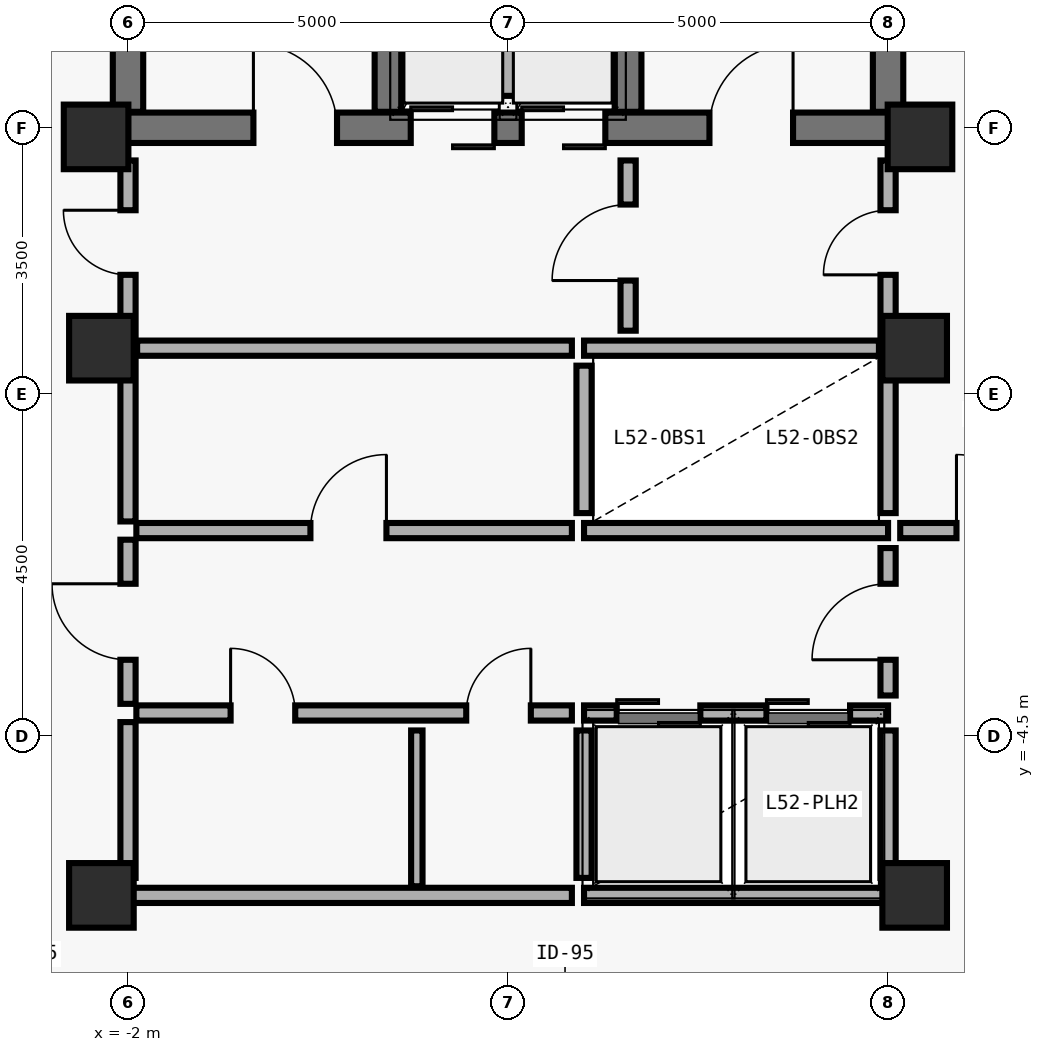
"""IFC4 building model, lengths in metres.
Left out: names, types, materials, properties, quantities, classifications, styles, units other than length and angle.
Written with IfcOpenShell. Run it as: python <this file> out.ifc"""

import sys

from ifc_helpers import new_model, si_unit, direction, frame, frame_2d, origin, origin_2d, place, context, subcontext, project, spatial, rectangle, extrude, element, fill, save


model = new_model("IFC4")
c1 = context("Model", 3, precision=1e-05, world=origin(), true_north=direction((0.0, 1.0)))
c2 = subcontext(c1, "Body", "Model", "MODEL_VIEW")
j1 = project(units=[si_unit("LENGTHUNIT", "METRE"), si_unit("PLANEANGLEUNIT", "RADIAN")], contexts=[c1])
p1 = place(None, origin())
s1 = spatial("IfcSite", under=j1, at=p1, CompositionType="ELEMENT")
p2 = place(p1, origin())
s2 = spatial("IfcBuilding", under=s1, at=p2, CompositionType="ELEMENT")
p3 = place(p2, frame((0.0, 0.0, 207.6)))
s3 = spatial("IfcBuildingStorey", under=s2, at=p3, CompositionType="ELEMENT", Elevation=207.6)
p4 = place(p3, frame((-2.0, 3.5, 0.0), z_axis=(0.0, 0.0, 1.0), x_axis=(1.0, 0.0, 0.0)))
e1 = element("IfcWall", 1, at=p4, inside=s3, PredefinedType="SHEAR", context=c2, shape_type="SweptSolid", body=[
    extrude(rectangle(XDim=10.0, YDim=0.4, at=frame_2d((5.0, 0.0))), origin(), (0.0, 0.0, 1.0), 3.592),
])
p5 = place(p4, frame((1.65, 0.0, 0.0)))
e2 = element("IfcOpeningElement", 2, at=p5, cuts=e1, PredefinedType="OPENING", context=c2, shape_type="SweptSolid", body=[
    extrude(rectangle(XDim=1.1, YDim=2.15, at=frame_2d((0.55, 1.075))), frame((0.0, 0.21, 0.0), z_axis=(0.0, -1.0, 0.0), x_axis=(1.0, 0.0, 0.0)), (0.0, 0.0, 1.0), 0.42),
])
p6 = place(p4, frame((7.65, 0.0, 0.0)))
e3 = element("IfcOpeningElement", 3, at=p6, cuts=e1, PredefinedType="OPENING", context=c2, shape_type="SweptSolid", body=[
    extrude(rectangle(XDim=1.1, YDim=2.15, at=frame_2d((0.55, 1.075))), frame((0.0, 0.21, 0.0), z_axis=(0.0, -1.0, 0.0), x_axis=(1.0, 0.0, 0.0)), (0.0, 0.0, 1.0), 0.42),
])
p7 = place(p4, frame((3.72, 0.0, 0.0)))
e4 = element("IfcOpeningElement", 4, at=p7, cuts=e1, PredefinedType="OPENING", context=c2, shape_type="SweptSolid", body=[
    extrude(rectangle(XDim=1.1, YDim=2.2, at=frame_2d((0.55, 1.1))), frame((0.0, 0.21, 0.0), z_axis=(0.0, -1.0, 0.0), x_axis=(1.0, 0.0, 0.0)), (0.0, 0.0, 1.0), 0.42),
])
p8 = place(p4, frame((5.18, 0.0, 0.0)))
e5 = element("IfcOpeningElement", 5, at=p8, cuts=e1, PredefinedType="OPENING", context=c2, shape_type="SweptSolid", body=[
    extrude(rectangle(XDim=1.1, YDim=2.2, at=frame_2d((0.55, 1.1))), frame((0.0, 0.21, 0.0), z_axis=(0.0, -1.0, 0.0), x_axis=(1.0, 0.0, 0.0)), (0.0, 0.0, 1.0), 0.42),
])
for number, where, z_axis, x_axis in (
    (6, (-2.0, 3.71, 0.0), (0.0, 0.0, 1.0), (0.0, 1.0, 0.0)),
    (7, (8.0, 3.71, 0.0), (0.0, 0.0, 1.0), (0.0, 1.0, 0.0)),
):
    element("IfcWall", number, at=place(p3, frame(where, z_axis=z_axis, x_axis=x_axis)), inside=s3, PredefinedType="SHEAR", context=c2, shape_type="SweptSolid", body=[
        extrude(rectangle(XDim=8.58, YDim=0.4, at=frame_2d((4.29, 0.0))), origin(), (0.0, 0.0, 1.0), 3.592),
    ])
for number, where, z_axis, x_axis in (
    (8, (1.42, 3.71, 0.0), (0.0, 0.0, 1.0), (0.0, 1.0, 0.0)),
    (9, (4.58, 3.71, 0.0), (0.0, 0.0, 1.0), (0.0, 1.0, 0.0)),
):
    element("IfcWall", number, at=place(p3, frame(where, z_axis=z_axis, x_axis=x_axis)), inside=s3, PredefinedType="SHEAR", context=c2, shape_type="SweptSolid", body=[
        extrude(rectangle(XDim=8.58, YDim=0.35, at=frame_2d((4.29, 0.0))), origin(), (0.0, 0.0, 1.0), 3.592),
    ])
for number, where, z_axis, x_axis in (
    (10, (-2.42, 3.38, 0.0), (0.0, 0.0, 1.0), (1.0, 0.0, 0.0)),
    (11, (8.42, 3.38, 0.0), (0.0, 0.0, 1.0), (1.0, 0.0, 0.0)),
    (12, (-2.35, 0.6, 0.0), (0.0, 0.0, 1.0), (1.0, 0.0, 0.0)),
    (13, (8.35, 0.6, 0.0), (0.0, 0.0, 1.0), (1.0, 0.0, 0.0)),
    (14, (-2.35, -6.6, 0.0), (0.0, 0.0, 1.0), (1.0, 0.0, 0.0)),
    (15, (8.35, -6.6, 0.0), (0.0, 0.0, 1.0), (1.0, 0.0, 0.0)),
):
    element("IfcColumn", number, at=place(p3, frame(where, z_axis=z_axis, x_axis=x_axis)), inside=s3, PredefinedType="COLUMN", context=c2, shape_type="SweptSolid", body=[
        extrude(rectangle(XDim=0.85, YDim=0.85, at=origin_2d()), origin(), (0.0, 0.0, 1.0), 3.575),
    ])
p9 = place(p3, frame((3.0, 3.92, 0.0), z_axis=(0.0, 0.0, 1.0), x_axis=(0.0, 1.0, 0.0)))
e16 = element("IfcWall", 16, at=p9, inside=s3, PredefinedType="SOLIDWALL", context=c2, shape_type="SweptSolid", body=[
    extrude(rectangle(XDim=2.03, YDim=0.2, at=frame_2d((1.015, 0.0))), origin(), (0.0, 0.0, 1.0), 3.36),
])
p10 = place(p3, frame((4.0, 0.6, 0.0), z_axis=(0.0, 0.0, 1.0), x_axis=(1.0, 0.0, 0.0)))
e17 = element("IfcWall", 17, at=p10, inside=s3, PredefinedType="SOLIDWALL", context=c2, shape_type="SweptSolid", body=[
    extrude(rectangle(XDim=3.88, YDim=0.2, at=frame_2d((1.94, 0.0))), origin(), (0.0, 0.0, 1.0), 3.012),
])
p11 = place(p3, frame((4.0, -1.8, 0.0), z_axis=(0.0, 0.0, 1.0), x_axis=(1.0, 0.0, 0.0)))
e18 = element("IfcWall", 18, at=p11, inside=s3, PredefinedType="SOLIDWALL", context=c2, shape_type="SweptSolid", body=[
    extrude(rectangle(XDim=4.0, YDim=0.2, at=frame_2d((2.0, 0.0))), origin(), (0.0, 0.0, 1.0), 3.36),
])
p12 = place(p3, frame((4.0, -1.57, 0.0), z_axis=(0.0, 0.0, 1.0), x_axis=(0.0, 1.0, 0.0)))
e19 = element("IfcWall", 19, at=p12, inside=s3, PredefinedType="SOLIDWALL", context=c2, shape_type="SweptSolid", body=[
    extrude(rectangle(XDim=1.94, YDim=0.2, at=frame_2d((0.97, 0.0))), origin(), (0.0, 0.0, 1.0), 3.36),
])
p13 = place(p3, frame((8.0, -1.57, 0.0), z_axis=(0.0, 0.0, 1.0), x_axis=(0.0, 1.0, 0.0)))
e20 = element("IfcWall", 20, at=p13, inside=s3, PredefinedType="SOLIDWALL", context=c2, shape_type="SweptSolid", body=[
    extrude(rectangle(XDim=2.05, YDim=0.2, at=frame_2d((1.025, 0.0))), origin(), (0.0, 0.0, 1.0), 3.012),
])
p14 = place(p3, frame((4.0, -4.2, 0.0), z_axis=(0.0, 0.0, 1.0), x_axis=(1.0, 0.0, 0.0)))
e21 = element("IfcWall", 21, at=p14, inside=s3, PredefinedType="SOLIDWALL", context=c2, shape_type="SweptSolid", body=[
    extrude(rectangle(XDim=4.0, YDim=0.2, at=frame_2d((2.0, 0.0))), origin(), (0.0, 0.0, 1.0), 3.36),
])
p15 = place(p14, frame((0.43, 0.0, 0.0)))
e22 = element("IfcOpeningElement", 22, at=p15, cuts=e21, PredefinedType="OPENING", context=c2, shape_type="SweptSolid", body=[
    extrude(rectangle(XDim=1.1, YDim=2.2, at=frame_2d((0.55, 1.1))), frame((0.0, 0.11, 0.0), z_axis=(0.0, -1.0, 0.0), x_axis=(1.0, 0.0, 0.0)), (0.0, 0.0, 1.0), 0.22),
])
p16 = place(p14, frame((2.4, 0.0, 0.0)))
e23 = element("IfcOpeningElement", 23, at=p16, cuts=e21, PredefinedType="OPENING", context=c2, shape_type="SweptSolid", body=[
    extrude(rectangle(XDim=1.1, YDim=2.2, at=frame_2d((0.55, 1.1))), frame((0.0, 0.11, 0.0), z_axis=(0.0, -1.0, 0.0), x_axis=(1.0, 0.0, 0.0)), (0.0, 0.0, 1.0), 0.22),
])
p17 = place(p3, frame((4.0, -6.6, 0.0), z_axis=(0.0, 0.0, 1.0), x_axis=(1.0, 0.0, 0.0)))
e24 = element("IfcWall", 24, at=p17, inside=s3, PredefinedType="SOLIDWALL", context=c2, shape_type="SweptSolid", body=[
    extrude(rectangle(XDim=4.0, YDim=0.2, at=frame_2d((2.0, 0.0))), origin(), (0.0, 0.0, 1.0), 3.012),
])
p18 = place(p3, frame((4.0, -6.37, 0.0), z_axis=(0.0, 0.0, 1.0), x_axis=(0.0, 1.0, 0.0)))
e25 = element("IfcWall", 25, at=p18, inside=s3, PredefinedType="SOLIDWALL", context=c2, shape_type="SweptSolid", body=[
    extrude(rectangle(XDim=1.94, YDim=0.2, at=frame_2d((0.97, 0.0))), origin(), (0.0, 0.0, 1.0), 3.36),
])
p19 = place(p3, frame((8.0, -6.37, 0.0), z_axis=(0.0, 0.0, 1.0), x_axis=(0.0, 1.0, 0.0)))
e26 = element("IfcWall", 26, at=p19, inside=s3, PredefinedType="SOLIDWALL", context=c2, shape_type="SweptSolid", body=[
    extrude(rectangle(XDim=1.94, YDim=0.2, at=frame_2d((0.97, 0.0))), origin(), (0.0, 0.0, 1.0), 3.012),
])
p20 = place(p3, frame((4.58, 0.83, 0.0), z_axis=(0.0, 0.0, 1.0), x_axis=(0.0, 1.0, 0.0)))
e27 = element("IfcWall", 27, at=p20, inside=s3, PredefinedType="MOVABLE", context=c2, shape_type="SweptSolid", body=[
    extrude(rectangle(XDim=2.24, YDim=0.2, at=frame_2d((1.12, 0.0))), origin(), (0.0, 0.0, 1.0), 3.36),
])
p21 = place(p20, frame((0.66, 0.0, 0.0)))
e28 = element("IfcOpeningElement", 28, at=p21, cuts=e27, PredefinedType="OPENING", context=c2, shape_type="SweptSolid", body=[
    extrude(rectangle(XDim=1.0, YDim=2.1, at=frame_2d((0.5, 1.05))), frame((0.0, 0.11, 0.0), z_axis=(0.0, -1.0, 0.0), x_axis=(1.0, 0.0, 0.0)), (0.0, 0.0, 1.0), 0.22),
])
p22 = place(p3, frame((-2.0, 0.72, 0.0), z_axis=(0.0, 0.0, 1.0), x_axis=(0.0, 1.0, 0.0)))
e29 = element("IfcWall", 29, at=p22, inside=s3, PredefinedType="MOVABLE", context=c2, shape_type="SweptSolid", body=[
    extrude(rectangle(XDim=2.35, YDim=0.2, at=frame_2d((1.175, 0.0))), origin(), (0.0, 0.0, 1.0), 2.692),
])
p23 = place(p22, frame((0.845, 0.0, 0.0)))
e30 = element("IfcOpeningElement", 30, at=p23, cuts=e29, PredefinedType="OPENING", context=c2, shape_type="SweptSolid", body=[
    extrude(rectangle(XDim=0.85, YDim=2.1, at=frame_2d((0.425, 1.05))), frame((0.0, 0.11, 0.0), z_axis=(0.0, -1.0, 0.0), x_axis=(1.0, 0.0, 0.0)), (0.0, 0.0, 1.0), 0.22),
])
p24 = place(p3, frame((8.0, 0.72, 0.0), z_axis=(0.0, 0.0, 1.0), x_axis=(0.0, 1.0, 0.0)))
e31 = element("IfcWall", 31, at=p24, inside=s3, PredefinedType="MOVABLE", context=c2, shape_type="SweptSolid", body=[
    extrude(rectangle(XDim=2.35, YDim=0.2, at=frame_2d((1.175, 0.0))), origin(), (0.0, 0.0, 1.0), 2.692),
])
p25 = place(p24, frame((0.845, 0.0, 0.0)))
e32 = element("IfcOpeningElement", 32, at=p25, cuts=e31, PredefinedType="OPENING", context=c2, shape_type="SweptSolid", body=[
    extrude(rectangle(XDim=0.85, YDim=2.1, at=frame_2d((0.425, 1.05))), frame((0.0, 0.11, 0.0), z_axis=(0.0, -1.0, 0.0), x_axis=(1.0, 0.0, 0.0)), (0.0, 0.0, 1.0), 0.22),
])
p26 = place(p3, frame((-2.0, -4.08, 0.0), z_axis=(0.0, 0.0, 1.0), x_axis=(0.0, 1.0, 0.0)))
e33 = element("IfcWall", 33, at=p26, inside=s3, PredefinedType="MOVABLE", context=c2, shape_type="SweptSolid", body=[
    extrude(rectangle(XDim=2.16, YDim=0.2, at=frame_2d((1.08, 0.0))), origin(), (0.0, 0.0, 1.0), 3.012),
])
p27 = place(p26, frame((0.58, 0.0, 0.0)))
e34 = element("IfcOpeningElement", 34, at=p27, cuts=e33, PredefinedType="OPENING", context=c2, shape_type="SweptSolid", body=[
    extrude(rectangle(XDim=1.0, YDim=2.1, at=frame_2d((0.5, 1.05))), frame((0.0, 0.11, 0.0), z_axis=(0.0, -1.0, 0.0), x_axis=(1.0, 0.0, 0.0)), (0.0, 0.0, 1.0), 0.22),
])
p28 = place(p3, frame((8.0, -3.97, 0.0), z_axis=(0.0, 0.0, 1.0), x_axis=(0.0, 1.0, 0.0)))
e35 = element("IfcWall", 35, at=p28, inside=s3, PredefinedType="MOVABLE", context=c2, shape_type="SweptSolid", body=[
    extrude(rectangle(XDim=1.94, YDim=0.2, at=frame_2d((0.97, 0.0))), origin(), (0.0, 0.0, 1.0), 3.012),
])
p29 = place(p28, frame((0.47, 0.0, 0.0)))
e36 = element("IfcOpeningElement", 36, at=p29, cuts=e35, PredefinedType="OPENING", context=c2, shape_type="SweptSolid", body=[
    extrude(rectangle(XDim=1.0, YDim=2.1, at=frame_2d((0.5, 1.05))), frame((0.0, 0.11, 0.0), z_axis=(0.0, -1.0, 0.0), x_axis=(1.0, 0.0, 0.0)), (0.0, 0.0, 1.0), 0.22),
])
p30 = place(p3, frame((-1.89, -1.8, 0.0), z_axis=(0.0, 0.0, 1.0), x_axis=(1.0, 0.0, 0.0)))
e37 = element("IfcWall", 37, at=p30, inside=s3, PredefinedType="MOVABLE", context=c2, shape_type="SweptSolid", body=[
    extrude(rectangle(XDim=5.73, YDim=0.2, at=frame_2d((2.865, 0.0))), origin(), (0.0, 0.0, 1.0), 3.36),
])
p31 = place(p30, frame((2.29, 0.0, 0.0)))
e38 = element("IfcOpeningElement", 38, at=p31, cuts=e37, PredefinedType="OPENING", context=c2, shape_type="SweptSolid", body=[
    extrude(rectangle(XDim=1.0, YDim=2.1, at=frame_2d((0.5, 1.05))), frame((0.0, 0.11, 0.0), z_axis=(0.0, -1.0, 0.0), x_axis=(1.0, 0.0, 0.0)), (0.0, 0.0, 1.0), 0.22),
])
p32 = place(p3, frame((-1.89, -4.2, 0.0), z_axis=(0.0, 0.0, 1.0), x_axis=(1.0, 0.0, 0.0)))
e39 = element("IfcWall", 39, at=p32, inside=s3, PredefinedType="MOVABLE", context=c2, shape_type="SweptSolid", body=[
    extrude(rectangle(XDim=5.73, YDim=0.2, at=frame_2d((2.865, 0.0))), origin(), (0.0, 0.0, 1.0), 3.36),
])
p33 = place(p32, frame((1.24, 0.0, 0.0)))
e40 = element("IfcOpeningElement", 40, at=p33, cuts=e39, PredefinedType="OPENING", context=c2, shape_type="SweptSolid", body=[
    extrude(rectangle(XDim=0.85, YDim=2.1, at=frame_2d((0.425, 1.05))), frame((0.0, 0.11, 0.0), z_axis=(0.0, -1.0, 0.0), x_axis=(1.0, 0.0, 0.0)), (0.0, 0.0, 1.0), 0.22),
])
p34 = place(p32, frame((4.34, 0.0, 0.0)))
e41 = element("IfcOpeningElement", 41, at=p34, cuts=e39, PredefinedType="OPENING", context=c2, shape_type="SweptSolid", body=[
    extrude(rectangle(XDim=0.85, YDim=2.1, at=frame_2d((0.425, 1.05))), frame((0.0, 0.11, 0.0), z_axis=(0.0, -1.0, 0.0), x_axis=(1.0, 0.0, 0.0)), (0.0, 0.0, 1.0), 0.22),
])
p35 = place(p3, frame((8.16, -1.8, 0.0), z_axis=(0.0, 0.0, 1.0), x_axis=(1.0, 0.0, 0.0)))
e42 = element("IfcWall", 42, at=p35, inside=s3, PredefinedType="MOVABLE", context=c2, shape_type="SweptSolid", body=[
    extrude(rectangle(XDim=2.64, YDim=0.2, at=frame_2d((1.32, 0.0))), origin(), (0.0, 0.0, 1.0), 3.36),
])
p36 = place(p35, frame((0.74, 0.0, 0.0)))
e43 = element("IfcOpeningElement", 43, at=p36, cuts=e42, PredefinedType="OPENING", context=c2, shape_type="SweptSolid", body=[
    extrude(rectangle(XDim=1.0, YDim=2.1, at=frame_2d((0.5, 1.05))), frame((0.0, 0.11, 0.0), z_axis=(0.0, -1.0, 0.0), x_axis=(1.0, 0.0, 0.0)), (0.0, 0.0, 1.0), 0.22),
])
p37 = place(p3, frame((-1.88, 0.6, 0.0), z_axis=(0.0, 0.0, 1.0), x_axis=(1.0, 0.0, 0.0)))
e44 = element("IfcWall", 44, at=p37, inside=s3, PredefinedType="MOVABLE", context=c2, shape_type="SweptSolid", body=[
    extrude(rectangle(XDim=5.72, YDim=0.2, at=frame_2d((2.86, 0.0))), origin(), (0.0, 0.0, 1.0), 3.012),
])
p38 = place(p3, frame((-2.0, -1.68, 0.0), z_axis=(0.0, 0.0, 1.0), x_axis=(0.0, 1.0, 0.0)))
e45 = element("IfcWall", 45, at=p38, inside=s3, PredefinedType="MOVABLE", context=c2, shape_type="SweptSolid", body=[
    extrude(rectangle(XDim=2.16, YDim=0.2, at=frame_2d((1.08, 0.0))), origin(), (0.0, 0.0, 1.0), 3.012),
])
p39 = place(p3, frame((1.8, -6.48, 0.0), z_axis=(0.0, 0.0, 1.0), x_axis=(0.0, 1.0, 0.0)))
e46 = element("IfcWall", 46, at=p39, inside=s3, PredefinedType="PARTITIONING", context=c2, shape_type="SweptSolid", body=[
    extrude(rectangle(XDim=2.05, YDim=0.15, at=frame_2d((1.025, 0.0))), origin(), (0.0, 0.0, 1.0), 3.36),
])
p40 = place(p3, frame((-2.0, -6.6, 0.0), z_axis=(0.0, 0.0, 1.0), x_axis=(1.0, 0.0, 0.0)))
e47 = element("IfcWall", 47, at=p40, inside=s3, PredefinedType="MOVABLE", context=c2, shape_type="SweptSolid", body=[
    extrude(rectangle(XDim=5.84, YDim=0.2, at=frame_2d((2.92, 0.0))), origin(), (0.0, 0.0, 1.0), 3.012),
])
p41 = place(p3, frame((-2.0, -6.37, 0.0), z_axis=(0.0, 0.0, 1.0), x_axis=(0.0, 1.0, 0.0)))
e48 = element("IfcWall", 48, at=p41, inside=s3, PredefinedType="MOVABLE", context=c2, shape_type="SweptSolid", body=[
    extrude(rectangle(XDim=2.05, YDim=0.2, at=frame_2d((1.025, 0.0))), origin(), (0.0, 0.0, 1.0), 3.012),
])
p42 = place(p5, origin())
e49 = element("IfcDoor", 49, at=p42, inside=s3, OperationType="SINGLE_SWING_LEFT", PredefinedType="DOOR", context=c2, shape_type="SweptSolid", body=[
    extrude(rectangle(XDim=1.1, YDim=2.15, at=frame_2d((0.55, 1.075))), frame((0.0, 0.025, 0.0), z_axis=(0.0, -1.0, 0.0), x_axis=(1.0, 0.0, 0.0)), (0.0, 0.0, 1.0), 0.05),
])
fill(e2, e49)
p43 = place(p6, origin())
e50 = element("IfcDoor", 50, at=p43, inside=s3, OperationType="SINGLE_SWING_RIGHT", PredefinedType="DOOR", context=c2, shape_type="SweptSolid", body=[
    extrude(rectangle(XDim=1.1, YDim=2.15, at=frame_2d((0.55, 1.075))), frame((0.0, 0.025, 0.0), z_axis=(0.0, -1.0, 0.0), x_axis=(1.0, 0.0, 0.0)), (0.0, 0.0, 1.0), 0.05),
])
fill(e3, e50)
p44 = place(p7, origin())
e51 = element("IfcDoor", 51, at=p44, inside=s3, OperationType="DOUBLE_DOOR_SLIDING", PredefinedType="DOOR", context=c2, shape_type="SweptSolid", body=[
    extrude(rectangle(XDim=1.1, YDim=2.2, at=frame_2d((0.55, 1.1))), frame((0.0, 0.025, 0.0), z_axis=(0.0, -1.0, 0.0), x_axis=(1.0, 0.0, 0.0)), (0.0, 0.0, 1.0), 0.05),
])
fill(e4, e51)
p45 = place(p8, origin())
e52 = element("IfcDoor", 52, at=p45, inside=s3, OperationType="DOUBLE_DOOR_SLIDING", PredefinedType="DOOR", context=c2, shape_type="SweptSolid", body=[
    extrude(rectangle(XDim=1.1, YDim=2.2, at=frame_2d((0.55, 1.1))), frame((0.0, 0.025, 0.0), z_axis=(0.0, -1.0, 0.0), x_axis=(1.0, 0.0, 0.0)), (0.0, 0.0, 1.0), 0.05),
])
fill(e5, e52)
p46 = place(p21, origin())
e53 = element("IfcDoor", 53, at=p46, inside=s3, OperationType="SINGLE_SWING_LEFT", PredefinedType="DOOR", context=c2, shape_type="SweptSolid", body=[
    extrude(rectangle(XDim=1.0, YDim=2.1, at=frame_2d((0.5, 1.05))), frame((0.0, 0.025, 0.0), z_axis=(0.0, -1.0, 0.0), x_axis=(1.0, 0.0, 0.0)), (0.0, 0.0, 1.0), 0.05),
])
fill(e28, e53)
p47 = place(p23, origin())
e54 = element("IfcDoor", 54, at=p47, inside=s3, OperationType="SINGLE_SWING_RIGHT", PredefinedType="DOOR", context=c2, shape_type="SweptSolid", body=[
    extrude(rectangle(XDim=0.85, YDim=2.1, at=frame_2d((0.425, 1.05))), frame((0.0, 0.025, 0.0), z_axis=(0.0, -1.0, 0.0), x_axis=(1.0, 0.0, 0.0)), (0.0, 0.0, 1.0), 0.05),
])
fill(e30, e54)
p48 = place(p25, origin())
e55 = element("IfcDoor", 55, at=p48, inside=s3, OperationType="SINGLE_SWING_LEFT", PredefinedType="DOOR", context=c2, shape_type="SweptSolid", body=[
    extrude(rectangle(XDim=0.85, YDim=2.1, at=frame_2d((0.425, 1.05))), frame((0.0, 0.025, 0.0), z_axis=(0.0, -1.0, 0.0), x_axis=(1.0, 0.0, 0.0)), (0.0, 0.0, 1.0), 0.05),
])
fill(e32, e55)
p49 = place(p27, origin())
e56 = element("IfcDoor", 56, at=p49, inside=s3, OperationType="SINGLE_SWING_RIGHT", PredefinedType="DOOR", context=c2, shape_type="SweptSolid", body=[
    extrude(rectangle(XDim=1.0, YDim=2.1, at=frame_2d((0.5, 1.05))), frame((0.0, 0.025, 0.0), z_axis=(0.0, -1.0, 0.0), x_axis=(1.0, 0.0, 0.0)), (0.0, 0.0, 1.0), 0.05),
])
fill(e34, e56)
p50 = place(p29, origin())
e57 = element("IfcDoor", 57, at=p50, inside=s3, OperationType="SINGLE_SWING_LEFT", PredefinedType="DOOR", context=c2, shape_type="SweptSolid", body=[
    extrude(rectangle(XDim=1.0, YDim=2.1, at=frame_2d((0.5, 1.05))), frame((0.0, 0.025, 0.0), z_axis=(0.0, -1.0, 0.0), x_axis=(1.0, 0.0, 0.0)), (0.0, 0.0, 1.0), 0.05),
])
fill(e36, e57)
p51 = place(p31, origin())
e58 = element("IfcDoor", 58, at=p51, inside=s3, OperationType="SINGLE_SWING_RIGHT", PredefinedType="DOOR", context=c2, shape_type="SweptSolid", body=[
    extrude(rectangle(XDim=1.0, YDim=2.1, at=frame_2d((0.5, 1.05))), frame((0.0, 0.025, 0.0), z_axis=(0.0, -1.0, 0.0), x_axis=(1.0, 0.0, 0.0)), (0.0, 0.0, 1.0), 0.05),
])
fill(e38, e58)
p52 = place(p33, origin())
e59 = element("IfcDoor", 59, at=p52, inside=s3, OperationType="SINGLE_SWING_LEFT", PredefinedType="DOOR", context=c2, shape_type="SweptSolid", body=[
    extrude(rectangle(XDim=0.85, YDim=2.1, at=frame_2d((0.425, 1.05))), frame((0.0, 0.025, 0.0), z_axis=(0.0, -1.0, 0.0), x_axis=(1.0, 0.0, 0.0)), (0.0, 0.0, 1.0), 0.05),
])
fill(e40, e59)
p53 = place(p34, origin())
e60 = element("IfcDoor", 60, at=p53, inside=s3, OperationType="SINGLE_SWING_RIGHT", PredefinedType="DOOR", context=c2, shape_type="SweptSolid", body=[
    extrude(rectangle(XDim=0.85, YDim=2.1, at=frame_2d((0.425, 1.05))), frame((0.0, 0.025, 0.0), z_axis=(0.0, -1.0, 0.0), x_axis=(1.0, 0.0, 0.0)), (0.0, 0.0, 1.0), 0.05),
])
fill(e41, e60)
p54 = place(p36, origin())
e61 = element("IfcDoor", 61, at=p54, inside=s3, OperationType="SINGLE_SWING_LEFT", PredefinedType="DOOR", context=c2, shape_type="SweptSolid", body=[
    extrude(rectangle(XDim=1.0, YDim=2.1, at=frame_2d((0.5, 1.05))), frame((0.0, 0.025, 0.0), z_axis=(0.0, -1.0, 0.0), x_axis=(1.0, 0.0, 0.0)), (0.0, 0.0, 1.0), 0.05),
])
fill(e43, e61)
p55 = place(p15, origin())
e62 = element("IfcDoor", 62, at=p55, inside=s3, OperationType="DOUBLE_DOOR_SLIDING", PredefinedType="DOOR", context=c2, shape_type="SweptSolid", body=[
    extrude(rectangle(XDim=1.1, YDim=2.2, at=frame_2d((0.55, 1.1))), frame((0.0, 0.025, 0.0), z_axis=(0.0, -1.0, 0.0), x_axis=(1.0, 0.0, 0.0)), (0.0, 0.0, 1.0), 0.05),
])
fill(e22, e62)
p56 = place(p16, origin())
e63 = element("IfcDoor", 63, at=p56, inside=s3, OperationType="DOUBLE_DOOR_SLIDING", PredefinedType="DOOR", context=c2, shape_type="SweptSolid", body=[
    extrude(rectangle(XDim=1.1, YDim=2.2, at=frame_2d((0.55, 1.1))), frame((0.0, 0.025, 0.0), z_axis=(0.0, -1.0, 0.0), x_axis=(1.0, 0.0, 0.0)), (0.0, 0.0, 1.0), 0.05),
])
fill(e23, e63)
save(model, sys.argv[1])
